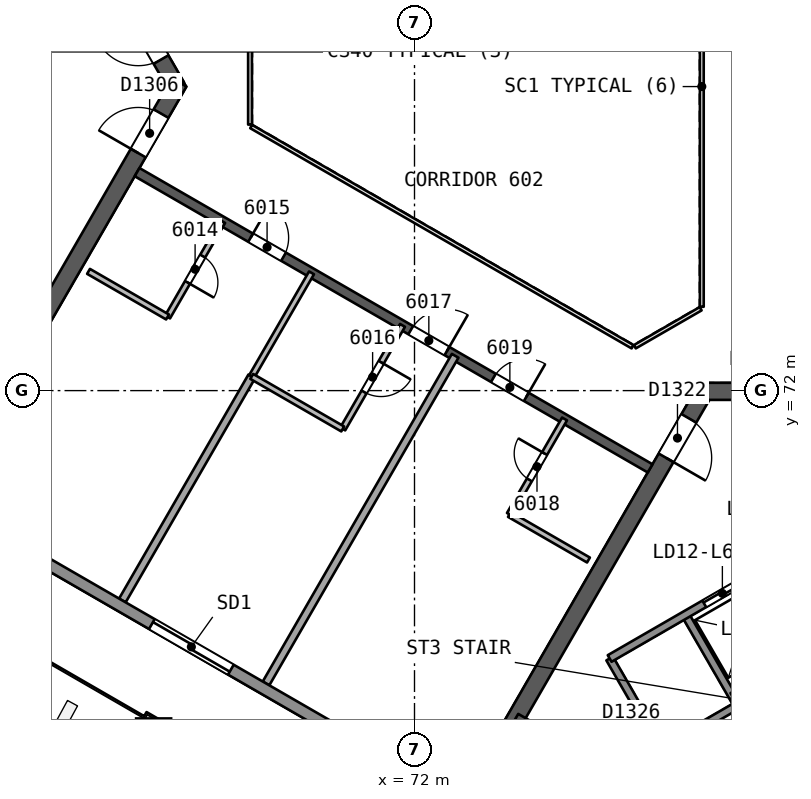
"""IFC4 building model, lengths in metres.
Left out: names, types, materials, properties, quantities, classifications, styles, units other than length and angle.
Written with IfcOpenShell. Run it as: python <this file> out.ifc"""

import sys

from ifc_helpers import new_model, si_unit, direction, frame, frame_2d, origin, origin_2d, place, context, subcontext, project, spatial, rectangle, extrude, element, fill, save


model = new_model("IFC4")
c1 = context("Model", 3, precision=1e-05, world=origin(), true_north=direction((0.0, 1.0)))
c2 = subcontext(c1, "Body", "Model", "MODEL_VIEW")
j1 = project(units=[si_unit("LENGTHUNIT", "METRE"), si_unit("PLANEANGLEUNIT", "RADIAN")], contexts=[c1])
p1 = place(None, origin())
s1 = spatial("IfcSite", under=j1, at=p1, CompositionType="ELEMENT")
p2 = place(p1, origin())
s2 = spatial("IfcBuilding", under=s1, at=p2, CompositionType="ELEMENT")
p3 = place(p2, frame((0.0, 0.0, 242.8)))
s3 = spatial("IfcBuildingStorey", under=s2, at=p3, CompositionType="ELEMENT", Elevation=242.8)
p4 = place(p3, frame((65.74, 80.0, 0.0), z_axis=(0.0, 0.0, 1.0), x_axis=(-0.499991857942, 0.866030104553, 0.0)))
e1 = element("IfcWall", 1, at=p4, inside=s3, PredefinedType="SHEAR", context=c2, shape_type="SweptSolid", body=[
    extrude(rectangle(XDim=10.25, YDim=0.45, at=frame_2d((5.125, 0.0))), origin(), (0.0, 0.0, 1.0), 3.7),
])
p5 = place(p4, frame((0.82, 0.0, 0.0)))
e2 = element("IfcOpeningElement", 2, at=p5, cuts=e1, PredefinedType="OPENING", context=c2, shape_type="SweptSolid", body=[
    extrude(rectangle(XDim=1.2, YDim=2.1, at=frame_2d((0.6, 1.05))), frame((0.0, 0.235, 0.0), z_axis=(0.0, -1.0, 0.0), x_axis=(1.0, 0.0, 0.0)), (0.0, 0.0, 1.0), 0.471),
])
p6 = place(p3, frame((60.728, 71.318, 0.0), z_axis=(0.0, 0.0, 1.0), x_axis=(0.500012416173, 0.866018235185, 0.0)))
e3 = element("IfcWall", 3, at=p6, inside=s3, PredefinedType="SHEAR", context=c2, shape_type="SweptSolid", body=[
    extrude(rectangle(XDim=10.155, YDim=0.45, at=frame_2d((5.078, 0.0))), origin(), (0.0, 0.0, 1.0), 3.7),
])
p7 = place(p6, frame((8.005, 0.0, 0.0)))
e4 = element("IfcOpeningElement", 4, at=p7, cuts=e3, PredefinedType="OPENING", context=c2, shape_type="SweptSolid", body=[
    extrude(rectangle(XDim=1.2, YDim=2.1, at=frame_2d((0.6, 1.05))), frame((0.0, 0.235, 0.0), z_axis=(0.0, -1.0, 0.0), x_axis=(1.0, 0.0, 0.0)), (0.0, 0.0, 1.0), 0.471),
])
p8 = place(p3, frame((79.63, 71.981, 0.0), z_axis=(0.0, 0.0, 1.0), x_axis=(-0.500002171595, -0.86602415001, 0.0)))
e5 = element("IfcWall", 5, at=p8, inside=s3, PredefinedType="SHEAR", context=c2, shape_type="SweptSolid", body=[
    extrude(rectangle(XDim=10.25, YDim=0.45, at=frame_2d((5.125, 0.0))), origin(), (0.0, 0.0, 1.0), 3.7),
])
p9 = place(p8, frame((0.82, 0.0, 0.0)))
e6 = element("IfcOpeningElement", 6, at=p9, cuts=e5, PredefinedType="OPENING", context=c2, shape_type="SweptSolid", body=[
    extrude(rectangle(XDim=1.2, YDim=2.1, at=frame_2d((0.6, 1.05))), frame((0.0, 0.235, 0.0), z_axis=(0.0, -1.0, 0.0), x_axis=(1.0, 0.0, 0.0)), (0.0, 0.0, 1.0), 0.471),
])
p10 = place(p3, frame((74.617, 63.299, 0.0), z_axis=(0.0, 0.0, 1.0), x_axis=(0.86602594008, -0.499999071108, 0.0)))
e7 = element("IfcWall", 7, at=p10, inside=s3, PredefinedType="SHEAR", context=c2, shape_type="SweptSolid", body=[
    extrude(rectangle(XDim=14.108, YDim=0.45, at=frame_2d((7.054, 0.0))), origin(), (0.0, 0.0, 1.0), 3.7),
])
p11 = place(p3, frame((89.655, 71.981, 0.0), z_axis=(0.0, 0.0, 1.0), x_axis=(-1.0, 0.0, 0.0)))
e8 = element("IfcWall", 8, at=p11, inside=s3, PredefinedType="SHEAR", context=c2, shape_type="SweptSolid", body=[
    extrude(rectangle(XDim=10.155, YDim=0.45, at=frame_2d((5.078, 0.0))), origin(), (0.0, 0.0, 1.0), 3.7),
])
p12 = place(p11, frame((8.005, 0.0, 0.0)))
e9 = element("IfcOpeningElement", 9, at=p12, cuts=e8, PredefinedType="OPENING", context=c2, shape_type="SweptSolid", body=[
    extrude(rectangle(XDim=1.2, YDim=2.1, at=frame_2d((0.6, 1.05))), frame((0.0, 0.235, 0.0), z_axis=(0.0, -1.0, 0.0), x_axis=(1.0, 0.0, 0.0)), (0.0, 0.0, 1.0), 0.471),
])
p13 = place(p3, frame((64.7, 77.748, 0.0), z_axis=(0.0, 0.0, 1.0), x_axis=(0.866026492143, -0.499998114903, 0.0)))
e10 = element("IfcWall", 10, at=p13, inside=s3, PredefinedType="SHEAR", context=c2, shape_type="SweptSolid", body=[
    extrude(rectangle(XDim=15.588, YDim=0.25, at=frame_2d((7.794, 0.0))), origin(), (0.0, 0.0, 1.0), 3.35),
])
p14 = place(p13, frame((3.45, 0.0, 0.0)))
e11 = element("IfcOpeningElement", 11, at=p14, cuts=e10, PredefinedType="OPENING", context=c2, shape_type="SweptSolid", body=[
    extrude(rectangle(XDim=1.0, YDim=2.1, at=frame_2d((0.5, 1.05))), frame((0.0, 0.135, 0.0), z_axis=(0.0, -1.0, 0.0), x_axis=(1.0, 0.0, 0.0)), (0.0, 0.0, 1.0), 0.271),
])
p15 = place(p13, frame((8.315, 0.0, 0.0)))
e12 = element("IfcOpeningElement", 12, at=p15, cuts=e10, PredefinedType="OPENING", context=c2, shape_type="SweptSolid", body=[
    extrude(rectangle(XDim=1.1, YDim=2.1, at=frame_2d((0.55, 1.05))), frame((0.0, 0.135, 0.0), z_axis=(0.0, -1.0, 0.0), x_axis=(1.0, 0.0, 0.0)), (0.0, 0.0, 1.0), 0.271),
])
p16 = place(p13, frame((10.827, 0.0, 0.0)))
e13 = element("IfcOpeningElement", 13, at=p16, cuts=e10, PredefinedType="OPENING", context=c2, shape_type="SweptSolid", body=[
    extrude(rectangle(XDim=1.0, YDim=2.1, at=frame_2d((0.5, 1.05))), frame((0.0, 0.135, 0.0), z_axis=(0.0, -1.0, 0.0), x_axis=(1.0, 0.0, 0.0)), (0.0, 0.0, 1.0), 0.271),
])
p17 = place(p3, frame((65.123, 62.893, 0.0), z_axis=(0.010093620709, 0.017482414954, 0.999796221231), x_axis=(-0.499907122366, -0.865843723195, 0.020187025824)))
e14 = element("IfcColumn", 14, at=p17, inside=s3, PredefinedType="COLUMN", context=c2, shape_type="SweptSolid", body=[
    extrude(rectangle(XDim=0.85, YDim=0.85, at=origin_2d()), origin(), (0.0, 0.0, 1.0), 3.701),
])
p18 = place(p3, frame((66.952, 76.448, 0.0), z_axis=(0.0, 0.0, 1.0), x_axis=(-0.499987231761, -0.866032775405, 0.0)))
e15 = element("IfcWall", 15, at=p18, inside=s3, PredefinedType="PARTITIONING", context=c2, shape_type="SweptSolid", body=[
    extrude(rectangle(XDim=2.9, YDim=0.15, at=frame_2d((1.45, 0.0))), origin(), (0.0, 0.0, 1.0), 3.35),
])
p19 = place(p18, frame((1.05, 0.0, 0.0)))
e16 = element("IfcOpeningElement", 16, at=p19, cuts=e15, PredefinedType="OPENING", context=c2, shape_type="SweptSolid", body=[
    extrude(rectangle(XDim=0.8, YDim=2.1, at=frame_2d((0.4, 1.05))), frame((0.0, 0.085, 0.0), z_axis=(0.0, -1.0, 0.0), x_axis=(1.0, 0.0, 0.0)), (0.0, 0.0, 1.0), 0.171),
])
p20 = place(p3, frame((65.502, 73.937, 0.0), z_axis=(0.0, 0.0, 1.0), x_axis=(-0.865994240961, 0.500053971709, 0.0)))
e17 = element("IfcWall", 17, at=p20, inside=s3, PredefinedType="PARTITIONING", context=c2, shape_type="SweptSolid", body=[
    extrude(rectangle(XDim=2.401, YDim=0.15, at=frame_2d((1.201, 0.0))), origin(), (0.0, 0.0, 1.0), 3.35),
])
p21 = place(p3, frame((64.312, 66.477, 0.0), z_axis=(0.0, 0.0, 1.0), x_axis=(0.500015286268, 0.866016578074, 0.0)))
e18 = element("IfcWall", 18, at=p21, inside=s3, PredefinedType="PARTITIONING", context=c2, shape_type="SweptSolid", body=[
    extrude(rectangle(XDim=6.808, YDim=0.2, at=frame_2d((3.404, 0.0))), origin(), (0.0, 0.0, 1.0), 3.35),
])
p22 = place(p3, frame((67.717, 72.373, 0.0), z_axis=(0.0, 0.0, 1.0), x_axis=(0.500002266011, 0.866024095498, 0.0)))
e19 = element("IfcWall", 19, at=p22, inside=s3, PredefinedType="PARTITIONING", context=c2, shape_type="SweptSolid", body=[
    extrude(rectangle(XDim=3.147, YDim=0.15, at=frame_2d((1.573, 0.0))), origin(), (0.0, 0.0, 1.0), 3.35),
])
p23 = place(p3, frame((71.684, 73.716, 0.0), z_axis=(0.0, 0.0, 1.0), x_axis=(-0.499977671647, -0.866038294681, 0.0)))
e20 = element("IfcWall", 20, at=p23, inside=s3, PredefinedType="PARTITIONING", context=c2, shape_type="SweptSolid", body=[
    extrude(rectangle(XDim=3.147, YDim=0.15, at=frame_2d((1.573, 0.0))), origin(), (0.0, 0.0, 1.0), 3.35),
])
p24 = place(p23, frame((1.123, 0.0, 0.0)))
e21 = element("IfcOpeningElement", 21, at=p24, cuts=e20, PredefinedType="OPENING", context=c2, shape_type="SweptSolid", body=[
    extrude(rectangle(XDim=0.9, YDim=2.1, at=frame_2d((0.45, 1.05))), frame((0.0, 0.085, 0.0), z_axis=(0.0, -1.0, 0.0), x_axis=(1.0, 0.0, 0.0)), (0.0, 0.0, 1.0), 0.171),
])
p25 = place(p3, frame((70.111, 70.991, 0.0), z_axis=(0.0, 0.0, 1.0), x_axis=(-0.866050310653, 0.499956857557, 0.0)))
e22 = element("IfcWall", 22, at=p25, inside=s3, PredefinedType="PARTITIONING", context=c2, shape_type="SweptSolid", body=[
    extrude(rectangle(XDim=2.765, YDim=0.15, at=frame_2d((1.382, 0.0))), origin(), (0.0, 0.0, 1.0), 3.35),
])
p26 = place(p3, frame((68.093, 64.295, 0.0), z_axis=(0.0, 0.0, 1.0), x_axis=(0.500011170278, 0.866018954525, 0.0)))
e23 = element("IfcWall", 23, at=p26, inside=s3, PredefinedType="PARTITIONING", context=c2, shape_type="SweptSolid", body=[
    extrude(rectangle(XDim=9.955, YDim=0.2, at=frame_2d((4.978, 0.0))), origin(), (0.0, 0.0, 1.0), 3.35),
])
p27 = place(p3, frame((76.578, 67.542, 0.0), z_axis=(0.0, 0.0, 1.0), x_axis=(-0.866038271014, 0.499977712642, 0.0)))
e24 = element("IfcWall", 24, at=p27, inside=s3, PredefinedType="PARTITIONING", context=c2, shape_type="SweptSolid", body=[
    extrude(rectangle(XDim=2.401, YDim=0.15, at=frame_2d((1.2, 0.0))), origin(), (0.0, 0.0, 1.0), 3.35),
])
p28 = place(p3, frame((74.498, 68.743, 0.0), z_axis=(0.0, 0.0, 1.0), x_axis=(0.499987231761, 0.866032775405, 0.0)))
e25 = element("IfcWall", 25, at=p28, inside=s3, PredefinedType="PARTITIONING", context=c2, shape_type="SweptSolid", body=[
    extrude(rectangle(XDim=2.9, YDim=0.15, at=frame_2d((1.45, 0.0))), origin(), (0.0, 0.0, 1.0), 3.35),
])
p29 = place(p28, frame((1.05, 0.0, 0.0)))
e26 = element("IfcOpeningElement", 26, at=p29, cuts=e25, PredefinedType="OPENING", context=c2, shape_type="SweptSolid", body=[
    extrude(rectangle(XDim=0.8, YDim=2.1, at=frame_2d((0.4, 1.05))), frame((0.0, 0.085, 0.0), z_axis=(0.0, -1.0, 0.0), x_axis=(1.0, 0.0, 0.0)), (0.0, 0.0, 1.0), 0.171),
])
p30 = place(p3, frame((87.821, 52.733, 0.0), z_axis=(0.0, 0.0, 1.0), x_axis=(-0.866025586464, 0.49999968359, 0.0)))
e27 = element("IfcWall", 27, at=p30, inside=s3, PredefinedType="SOLIDWALL", context=c2, shape_type="SweptSolid", body=[
    extrude(rectangle(XDim=49.474, YDim=0.3, at=frame_2d((24.737, 0.0))), origin(), (0.0, 0.0, 1.0), 3.35),
])
p31 = place(p30, frame((23.849, 0.0, 0.0)))
e28 = element("IfcOpeningElement", 28, at=p31, cuts=e27, PredefinedType="OPENING", context=c2, shape_type="SweptSolid", body=[
    extrude(rectangle(XDim=2.4, YDim=2.4, at=frame_2d((1.2, 1.2))), frame((0.0, 0.161, 0.0), z_axis=(0.0, -1.0, 0.0), x_axis=(1.0, 0.0, 0.0)), (0.0, 0.0, 1.0), 0.321),
])
p32 = place(p30, frame((37.196, 0.0, 0.0)))
e29 = element("IfcOpeningElement", 29, at=p32, cuts=e27, PredefinedType="OPENING", context=c2, shape_type="SweptSolid", body=[
    extrude(rectangle(XDim=2.4, YDim=2.4, at=frame_2d((1.2, 1.2))), frame((0.0, 0.161, 0.0), z_axis=(0.0, -1.0, 0.0), x_axis=(1.0, 0.0, 0.0)), (0.0, 0.0, 1.0), 0.321),
])
p33 = place(p30, frame((10.19, 0.0, 0.0)))
e30 = element("IfcOpeningElement", 30, at=p33, cuts=e27, PredefinedType="OPENING", context=c2, shape_type="SweptSolid", body=[
    extrude(rectangle(XDim=2.4, YDim=2.4, at=frame_2d((1.2, 1.2))), frame((0.0, 0.161, 0.0), z_axis=(0.0, -1.0, 0.0), x_axis=(1.0, 0.0, 0.0)), (0.0, 0.0, 1.0), 0.321),
])
for number, where, z_axis, x_axis in (
    (31, (77.135, 64.952, 0.0), (0.0, 0.0, 1.0), (0.5, -0.866, 0.0)),
    (32, (79.127, 66.102, 0.0), (0.0, 0.0, 1.0), (0.5, -0.866, 0.0)),
):
    element("IfcWall", number, at=place(p3, frame(where, z_axis=z_axis, x_axis=x_axis)), inside=s3, PredefinedType="SOLIDWALL", context=c2, shape_type="SweptSolid", body=[
        extrude(rectangle(XDim=2.75, YDim=0.2, at=frame_2d((1.375, 0.0))), origin(), (0.0, 0.0, 1.0), 3.35),
    ])
p34 = place(p3, frame((77.135, 64.952, 0.0), z_axis=(0.0, 0.0, 1.0), x_axis=(0.866031916153, 0.499988720078, 0.0)))
e33 = element("IfcWall", 33, at=p34, inside=s3, PredefinedType="SOLIDWALL", context=c2, shape_type="SweptSolid", body=[
    extrude(rectangle(XDim=11.35, YDim=0.2, at=frame_2d((5.675, 0.0))), origin(), (0.0, 0.0, 1.0), 3.35),
])
p35 = place(p34, frame((2.875, 0.0, 0.0)))
e34 = element("IfcOpeningElement", 34, at=p35, cuts=e33, PredefinedType="OPENING", context=c2, shape_type="SweptSolid", body=[
    extrude(rectangle(XDim=1.1, YDim=2.1, at=frame_2d((0.55, 1.05))), frame((0.0, 0.11, 0.0), z_axis=(0.0, -1.0, 0.0), x_axis=(1.0, 0.0, 0.0)), (0.0, 0.0, 1.0), 0.221),
])
p36 = place(p34, frame((5.125, 0.0, 0.0)))
e35 = element("IfcOpeningElement", 35, at=p36, cuts=e33, PredefinedType="OPENING", context=c2, shape_type="SweptSolid", body=[
    extrude(rectangle(XDim=1.1, YDim=2.1, at=frame_2d((0.55, 1.05))), frame((0.0, 0.11, 0.0), z_axis=(0.0, -1.0, 0.0), x_axis=(1.0, 0.0, 0.0)), (0.0, 0.0, 1.0), 0.221),
])
p37 = place(p34, frame((7.375, 0.0, 0.0)))
e36 = element("IfcOpeningElement", 36, at=p37, cuts=e33, PredefinedType="OPENING", context=c2, shape_type="SweptSolid", body=[
    extrude(rectangle(XDim=1.1, YDim=2.1, at=frame_2d((0.55, 1.05))), frame((0.0, 0.11, 0.0), z_axis=(0.0, -1.0, 0.0), x_axis=(1.0, 0.0, 0.0)), (0.0, 0.0, 1.0), 0.221),
])
p38 = place(p3, frame((80.367, 63.954, 0.0), z_axis=(0.0, 0.0, 1.0), x_axis=(0.866026575979, 0.499997969693, 0.0)))
e37 = element("IfcWall", 37, at=p38, inside=s3, PredefinedType="SOLIDWALL", context=c2, shape_type="SweptSolid", body=[
    extrude(rectangle(XDim=6.75, YDim=0.2, at=frame_2d((3.375, 0.0))), origin(), (0.0, 0.0, 1.0), 3.35),
])
p39 = place(p3, frame((78.51, 62.57, 0.0), z_axis=(0.0, 0.0, 1.0), x_axis=(0.866053019151, 0.499952165731, 0.0)))
e38 = element("IfcWall", 38, at=p39, inside=s3, PredefinedType="SOLIDWALL", context=c2, shape_type="SweptSolid", body=[
    extrude(rectangle(XDim=2.3, YDim=0.2, at=frame_2d((1.15, 0.0))), origin(), (0.0, 0.0, 1.0), 3.35),
])
p40 = place(p3, frame((79.56, 74.206, 0.0), z_axis=(0.0, 0.0, 1.0), x_axis=(0.0, 1.0, 0.0)))
e39 = element("IfcWall", 39, at=p40, inside=s3, PredefinedType="PARTITIONING", context=c2, shape_type="SweptSolid", body=[
    extrude(rectangle(XDim=11.588, YDim=0.1, at=frame_2d((5.794, 0.0))), origin(), (0.0, 0.0, 1.0), 3.35),
])
p41 = place(p3, frame((67.672, 81.0, 0.0), z_axis=(0.0, 0.0, 1.0), x_axis=(0.0, -1.0, 0.0)))
e40 = element("IfcWall", 40, at=p41, inside=s3, PredefinedType="PARTITIONING", context=c2, shape_type="SweptSolid", body=[
    extrude(rectangle(XDim=2.0, YDim=0.1, at=frame_2d((1.0, 0.0))), origin(), (0.0, 0.0, 1.0), 3.35),
])
p42 = place(p3, frame((67.702, 78.948, 0.0), z_axis=(0.0, 0.0, 1.0), x_axis=(0.866026658274, -0.499997827154, 0.0)))
e41 = element("IfcWall", 41, at=p42, inside=s3, PredefinedType="PARTITIONING", context=c2, shape_type="SweptSolid", body=[
    extrude(rectangle(XDim=11.588, YDim=0.1, at=frame_2d((5.794, 0.0))), origin(), (0.0, 0.0, 1.0), 3.35),
])
p43 = place(p3, frame((77.798, 73.154, 0.0), z_axis=(0.0, 0.0, 1.0), x_axis=(0.866041268327, 0.499972520799, 0.0)))
e42 = element("IfcWall", 42, at=p43, inside=s3, PredefinedType="PARTITIONING", context=c2, shape_type="SweptSolid", body=[
    extrude(rectangle(XDim=2.0, YDim=0.1, at=frame_2d((1.0, 0.0))), origin(), (0.0, 0.0, 1.0), 3.35),
])
p44 = place(p19, origin())
e43 = element("IfcDoor", 43, at=p44, inside=s3, OperationType="SINGLE_SWING_RIGHT", PredefinedType="NOTDEFINED", context=c2, shape_type="SweptSolid", body=[
    extrude(rectangle(XDim=0.8, YDim=2.1, at=frame_2d((0.4, 1.05))), frame((0.0, 0.025, 0.0), z_axis=(0.0, -1.0, 0.0), x_axis=(1.0, 0.0, 0.0)), (0.0, 0.0, 1.0), 0.05),
])
fill(e16, e43)
p45 = place(p14, origin())
e44 = element("IfcDoor", 44, at=p45, inside=s3, OperationType="SINGLE_SWING_LEFT", PredefinedType="NOTDEFINED", context=c2, shape_type="SweptSolid", body=[
    extrude(rectangle(XDim=1.0, YDim=2.1, at=frame_2d((0.5, 1.05))), frame((0.0, 0.025, 0.0), z_axis=(0.0, -1.0, 0.0), x_axis=(1.0, 0.0, 0.0)), (0.0, 0.0, 1.0), 0.05),
])
fill(e11, e44)
p46 = place(p24, origin())
e45 = element("IfcDoor", 45, at=p46, inside=s3, OperationType="SINGLE_SWING_LEFT", PredefinedType="NOTDEFINED", context=c2, shape_type="SweptSolid", body=[
    extrude(rectangle(XDim=0.9, YDim=2.1, at=frame_2d((0.45, 1.05))), frame((0.0, 0.025, 0.0), z_axis=(0.0, -1.0, 0.0), x_axis=(1.0, 0.0, 0.0)), (0.0, 0.0, 1.0), 0.05),
])
fill(e21, e45)
p47 = place(p15, origin())
e46 = element("IfcDoor", 46, at=p47, inside=s3, OperationType="SINGLE_SWING_RIGHT", PredefinedType="NOTDEFINED", context=c2, shape_type="SweptSolid", body=[
    extrude(rectangle(XDim=1.1, YDim=2.1, at=frame_2d((0.55, 1.05))), frame((0.0, 0.025, 0.0), z_axis=(0.0, -1.0, 0.0), x_axis=(1.0, 0.0, 0.0)), (0.0, 0.0, 1.0), 0.05),
])
fill(e12, e46)
p48 = place(p29, origin())
e47 = element("IfcDoor", 47, at=p48, inside=s3, OperationType="SINGLE_SWING_RIGHT", PredefinedType="NOTDEFINED", context=c2, shape_type="SweptSolid", body=[
    extrude(rectangle(XDim=0.8, YDim=2.1, at=frame_2d((0.4, 1.05))), frame((0.0, 0.025, 0.0), z_axis=(0.0, -1.0, 0.0), x_axis=(1.0, 0.0, 0.0)), (0.0, 0.0, 1.0), 0.05),
])
fill(e26, e47)
p49 = place(p16, origin())
e48 = element("IfcDoor", 48, at=p49, inside=s3, OperationType="SINGLE_SWING_RIGHT", PredefinedType="NOTDEFINED", context=c2, shape_type="SweptSolid", body=[
    extrude(rectangle(XDim=1.0, YDim=2.1, at=frame_2d((0.5, 1.05))), frame((0.0, 0.025, 0.0), z_axis=(0.0, -1.0, 0.0), x_axis=(1.0, 0.0, 0.0)), (0.0, 0.0, 1.0), 0.05),
])
fill(e13, e48)
p50 = place(p31, origin())
e49 = element("IfcDoor", 49, at=p50, inside=s3, OperationType="SLIDING_TO_LEFT", PredefinedType="NOTDEFINED", context=c2, shape_type="SweptSolid", body=[
    extrude(rectangle(XDim=2.4, YDim=2.4, at=frame_2d((1.2, 1.2))), frame((0.0, 0.025, 0.0), z_axis=(0.0, -1.0, 0.0), x_axis=(1.0, 0.0, 0.0)), (0.0, 0.0, 1.0), 0.05),
])
fill(e28, e49)
p51 = place(p5, origin())
e50 = element("IfcDoor", 50, at=p51, inside=s3, OperationType="SINGLE_SWING_RIGHT", PredefinedType="NOTDEFINED", context=c2, shape_type="SweptSolid", body=[
    extrude(rectangle(XDim=1.2, YDim=2.1, at=frame_2d((0.6, 1.05))), frame((0.0, 0.025, 0.0), z_axis=(0.0, -1.0, 0.0), x_axis=(1.0, 0.0, 0.0)), (0.0, 0.0, 1.0), 0.05),
])
fill(e2, e50)
p52 = place(p7, origin())
e51 = element("IfcDoor", 51, at=p52, inside=s3, OperationType="SINGLE_SWING_LEFT", PredefinedType="NOTDEFINED", context=c2, shape_type="SweptSolid", body=[
    extrude(rectangle(XDim=1.2, YDim=2.1, at=frame_2d((0.6, 1.05))), frame((0.0, 0.025, 0.0), z_axis=(0.0, -1.0, 0.0), x_axis=(1.0, 0.0, 0.0)), (0.0, 0.0, 1.0), 0.05),
])
fill(e4, e51)
p53 = place(p9, origin())
e52 = element("IfcDoor", 52, at=p53, inside=s3, OperationType="SINGLE_SWING_RIGHT", PredefinedType="NOTDEFINED", context=c2, shape_type="SweptSolid", body=[
    extrude(rectangle(XDim=1.2, YDim=2.1, at=frame_2d((0.6, 1.05))), frame((0.0, 0.025, 0.0), z_axis=(0.0, -1.0, 0.0), x_axis=(1.0, 0.0, 0.0)), (0.0, 0.0, 1.0), 0.05),
])
fill(e6, e52)
p54 = place(p35, origin())
e53 = element("IfcDoor", 53, at=p54, inside=s3, OperationType="SLIDING_TO_LEFT", PredefinedType="NOTDEFINED", context=c2, shape_type="SweptSolid", body=[
    extrude(rectangle(XDim=1.1, YDim=2.1, at=frame_2d((0.55, 1.05))), frame((0.0, 0.025, 0.0), z_axis=(0.0, -1.0, 0.0), x_axis=(1.0, 0.0, 0.0)), (0.0, 0.0, 1.0), 0.05),
])
fill(e34, e53)
save(model, sys.argv[1])
